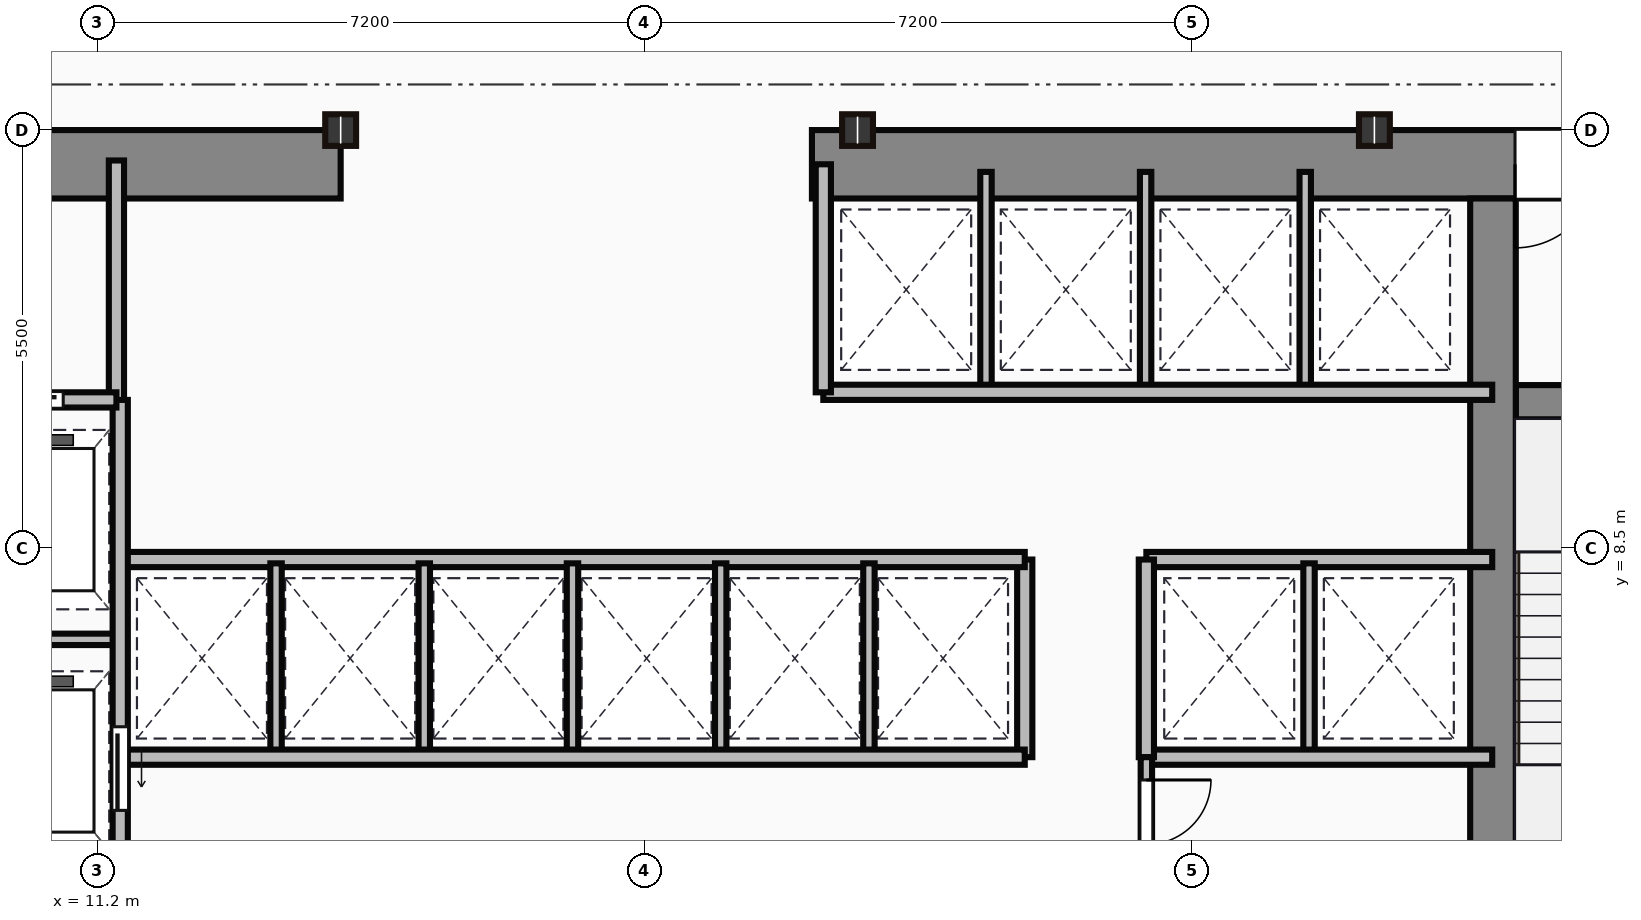
"""IFC4 building model, lengths in metres.
Left out: names, types, materials, properties, quantities, classifications, styles, units other than length and angle.
Written with IfcOpenShell. Run it as: python <this file> out.ifc"""

import sys

from ifc_helpers import new_model, si_unit, direction, frame, frame_2d, origin, origin_2d, place, context, subcontext, project, spatial, rectangle, i_section, extrude, source, transform, mapped, element, fill, save


model = new_model("IFC4")
c1 = context("Model", 3, precision=1e-05, world=origin(), true_north=direction((0.0, 1.0)))
c2 = subcontext(c1, "Body", "Model", "MODEL_VIEW")
j1 = project(units=[si_unit("LENGTHUNIT", "METRE"), si_unit("PLANEANGLEUNIT", "RADIAN")], contexts=[c1])
p1 = place(None, origin())
s1 = spatial("IfcSite", under=j1, at=p1, CompositionType="ELEMENT")
p2 = place(p1, origin())
s2 = spatial("IfcBuilding", under=s1, at=p2, CompositionType="ELEMENT")
p3 = place(p2, frame((0.0, 0.0, 72.65)))
s3 = spatial("IfcBuildingStorey", under=s2, at=p3, CompositionType="ELEMENT", Elevation=72.65)
m1 = source(origin(), c2, "Body", "SweptSolid", [
    extrude(rectangle(XDim=9.1, YDim=0.9, at=frame_2d((4.55, 0.0))), origin(), (0.0, 0.0, 1.0), 3.65),
])
p4 = place(p3, frame((5.3, 13.55, 0.0), z_axis=(0.0, 0.0, 1.0), x_axis=(1.0, 0.0, 0.0)))
e1 = element("IfcWall", 1, at=p4, inside=s3, PredefinedType="SHEAR", context=c2, shape_type="MappedRepresentation", body=[
    mapped(m1, transform((0.0, 0.0, 0.0))),
])
p5 = place(p4, frame((4.1, 0.0, 0.0)))
e2 = element("IfcOpeningElement", 2, at=p5, cuts=e1, PredefinedType="OPENING", context=c2, shape_type="SweptSolid", body=[
    extrude(rectangle(XDim=1.1, YDim=2.15, at=frame_2d((0.55, 1.075))), frame((0.0, 0.46, 0.0), z_axis=(0.0, -1.0, 0.0), x_axis=(1.0, 0.0, 0.0)), (0.0, 0.0, 1.0), 0.92),
])
m2 = source(origin(), c2, "Body", "SweptSolid", [
    extrude(rectangle(XDim=12.6, YDim=0.9, at=frame_2d((6.3, 0.0))), origin(), (0.0, 0.0, 1.0), 3.65),
])
p6 = place(p3, frame((20.6, 13.55, 0.0), z_axis=(0.0, 0.0, 1.0), x_axis=(1.0, 0.0, 0.0)))
e3 = element("IfcWall", 3, at=p6, inside=s3, PredefinedType="SHEAR", context=c2, shape_type="MappedRepresentation", body=[
    mapped(m2, transform((0.0, 0.0, 0.0))),
])
p7 = place(p6, frame((9.25, 0.0, 0.0)))
e4 = element("IfcOpeningElement", 4, at=p7, cuts=e3, PredefinedType="OPENING", context=c2, shape_type="SweptSolid", body=[
    extrude(rectangle(XDim=1.1, YDim=2.15, at=frame_2d((0.55, 1.075))), frame((0.0, 0.46, 0.0), z_axis=(0.0, -1.0, 0.0), x_axis=(1.0, 0.0, 0.0)), (0.0, 0.0, 1.0), 0.92),
])
m3 = source(origin(), c2, "Body", "SweptSolid", [
    extrude(rectangle(XDim=12.2, YDim=0.6, at=frame_2d((6.1, 0.0))), origin(), (0.0, 0.0, 1.0), 3.65),
])
p8 = place(p3, frame((29.56, 0.9, 0.0), z_axis=(0.0, 0.0, 1.0), x_axis=(0.0, 1.0, 0.0)))
e5 = element("IfcWall", 5, at=p8, inside=s3, PredefinedType="SHEAR", context=c2, shape_type="MappedRepresentation", body=[
    mapped(m3, transform((0.0, 0.0, 0.0))),
])
m4 = source(origin(), c2, "Body", "SweptSolid", [
    extrude(rectangle(XDim=3.39, YDim=0.45, at=frame_2d((1.695, 0.0))), origin(), (0.0, 0.0, 1.0), 3.65),
])
p9 = place(p3, frame((29.86, 10.42, 0.0), z_axis=(0.0, 0.0, 1.0), x_axis=(1.0, 0.0, 0.0)))
e6 = element("IfcWall", 6, at=p9, inside=s3, PredefinedType="SHEAR", context=c2, shape_type="MappedRepresentation", body=[
    mapped(m4, transform((0.0, 0.0, 0.0))),
])
p10 = place(p9, frame((1.1, 0.0, 0.0)))
e7 = element("IfcOpeningElement", 7, at=p10, cuts=e6, PredefinedType="OPENING", context=c2, shape_type="SweptSolid", body=[
    extrude(rectangle(XDim=1.1, YDim=2.15, at=frame_2d((0.55, 1.075))), frame((0.0, 0.235, 0.0), z_axis=(0.0, -1.0, 0.0), x_axis=(1.0, 0.0, 0.0)), (0.0, 0.0, 1.0), 0.47),
])
m5 = source(origin(), c2, "Body", "SweptSolid", [
    extrude(i_section(OverallWidth=0.406, OverallDepth=0.416, WebThickness=0.03, FlangeThickness=0.048, at=origin_2d()), origin(), (0.0, 0.0, 1.0), 3.65),
])
for number, where, z_axis, x_axis in (
    (8, (14.4, 14.0, 0.0), (0.0, 0.0, 1.0), (1.0, 0.0, 0.0)),
    (9, (21.2, 14.0, 0.0), (0.0, 0.0, 1.0), (1.0, 0.0, 0.0)),
    (10, (28.0, 14.0, 0.0), (0.0, 0.0, 1.0), (1.0, 0.0, 0.0)),
):
    element("IfcColumn", number, at=place(p3, frame(where, z_axis=z_axis, x_axis=x_axis)), inside=s3, PredefinedType="COLUMN", context=c2, shape_type="MappedRepresentation", body=[
        mapped(m5, transform((0.0, 0.0, 0.0))),
    ])
m6 = source(origin(), c2, "Body", "SweptSolid", [
    extrude(rectangle(XDim=3.18, YDim=0.2, at=frame_2d((1.59, 0.0))), origin(), (0.0, 0.0, 1.0), 3.4),
])
p11 = place(p3, frame((11.45, 10.42, 0.0), z_axis=(0.0, 0.0, 1.0), x_axis=(0.0, 1.0, 0.0)))
e11 = element("IfcWall", 11, at=p11, inside=s3, PredefinedType="PARTITIONING", context=c2, shape_type="MappedRepresentation", body=[
    mapped(m6, transform((0.0, 0.0, 0.0))),
])
m7 = source(origin(), c2, "Body", "SweptSolid", [
    extrude(rectangle(XDim=2.35, YDim=0.2, at=frame_2d((1.175, 0.0))), origin(), (0.0, 0.0, 1.0), 3.4),
])
p12 = place(p3, frame((9.1, 10.45, 0.0), z_axis=(0.0, 0.0, 1.0), x_axis=(1.0, 0.0, 0.0)))
e12 = element("IfcWall", 12, at=p12, inside=s3, PredefinedType="PARTITIONING", context=c2, shape_type="MappedRepresentation", body=[
    mapped(m7, transform((0.0, 0.0, 0.0))),
])
p13 = place(p12, frame((0.55, 0.0, 0.0)))
e13 = element("IfcOpeningElement", 13, at=p13, cuts=e12, PredefinedType="OPENING", context=c2, shape_type="SweptSolid", body=[
    extrude(rectangle(XDim=1.1, YDim=2.15, at=frame_2d((0.55, 1.075))), frame((0.0, 0.11, 0.0), z_axis=(0.0, -1.0, 0.0), x_axis=(1.0, 0.0, 0.0)), (0.0, 0.0, 1.0), 0.22),
])
m8 = source(origin(), c2, "Body", "SweptSolid", [
    extrude(rectangle(XDim=9.6, YDim=0.2, at=frame_2d((4.8, 0.0))), origin(), (0.0, 0.0, 1.0), 3.4),
])
p14 = place(p3, frame((11.5, 0.85, 0.0), z_axis=(0.0, 0.0, 1.0), x_axis=(0.0, 1.0, 0.0)))
e14 = element("IfcWall", 14, at=p14, inside=s3, PredefinedType="PARTITIONING", context=c2, shape_type="MappedRepresentation", body=[
    mapped(m8, transform((0.0, 0.0, 0.0))),
])
p15 = place(p14, frame((4.2, 0.0, 0.0)))
e15 = element("IfcOpeningElement", 15, at=p15, cuts=e14, PredefinedType="OPENING", context=c2, shape_type="SweptSolid", body=[
    extrude(rectangle(XDim=1.1, YDim=2.15, at=frame_2d((0.55, 1.075))), frame((0.0, 0.11, 0.0), z_axis=(0.0, -1.0, 0.0), x_axis=(1.0, 0.0, 0.0)), (0.0, 0.0, 1.0), 0.22),
])
p16 = place(p14, frame((0.9, 0.0, 0.0)))
e16 = element("IfcOpeningElement", 16, at=p16, cuts=e14, PredefinedType="OPENING", context=c2, shape_type="SweptSolid", body=[
    extrude(rectangle(XDim=1.2, YDim=2.15, at=frame_2d((0.6, 1.075))), frame((0.0, 0.11, 0.0), z_axis=(0.0, -1.0, 0.0), x_axis=(1.0, 0.0, 0.0)), (0.0, 0.0, 1.0), 0.22),
])
m9 = source(origin(), c2, "Body", "SweptSolid", [
    extrude(rectangle(XDim=2.4, YDim=0.15, at=frame_2d((1.2, 0.0))), origin(), (0.0, 0.0, 1.0), 3.4),
])
p17 = place(p3, frame((9.1, 7.3, 0.0), z_axis=(0.0, 0.0, 1.0), x_axis=(1.0, 0.0, 0.0)))
e17 = element("IfcWall", 17, at=p17, inside=s3, PredefinedType="PARTITIONING", context=c2, shape_type="MappedRepresentation", body=[
    mapped(m9, transform((0.0, 0.0, 0.0))),
])
m10 = source(origin(), c2, "Body", "SweptSolid", [
    extrude(rectangle(XDim=11.85, YDim=0.2, at=frame_2d((5.925, 0.0))), origin(), (0.0, 0.0, 1.0), 3.4),
])
for number, where, z_axis, x_axis in (
    (18, (11.55, 5.75, 0.0), (0.0, 0.0, 1.0), (1.0, 0.0, 0.0)),
    (19, (11.55, 8.35, 0.0), (0.0, 0.0, 1.0), (1.0, 0.0, 0.0)),
):
    element("IfcWall", number, at=place(p3, frame(where, z_axis=z_axis, x_axis=x_axis)), inside=s3, PredefinedType="PARTITIONING", context=c2, shape_type="MappedRepresentation", body=[
        mapped(m10, transform((0.0, 0.0, 0.0))),
    ])
m11 = source(origin(), c2, "Body", "SweptSolid", [
    extrude(rectangle(XDim=2.6, YDim=0.2, at=frame_2d((1.3, 0.0))), origin(), (0.0, 0.0, 1.0), 3.4),
])
p18 = place(p3, frame((23.4, 5.75, 0.0), z_axis=(0.0, 0.0, 1.0), x_axis=(0.0, 1.0, 0.0)))
e20 = element("IfcWall", 20, at=p18, inside=s3, PredefinedType="PARTITIONING", context=c2, shape_type="MappedRepresentation", body=[
    mapped(m11, transform((0.0, 0.0, 0.0))),
])
m12 = source(origin(), c2, "Body", "SweptSolid", [
    extrude(rectangle(XDim=2.5, YDim=0.15, at=frame_2d((1.25, 0.0))), origin(), (0.0, 0.0, 1.0), 3.4),
])
for number, where, z_axis, x_axis in (
    (21, (13.55, 5.8, 0.0), (0.0, 0.0, 1.0), (0.0, 1.0, 0.0)),
    (22, (15.5, 5.8, 0.0), (0.0, 0.0, 1.0), (0.0, 1.0, 0.0)),
    (23, (17.45, 5.8, 0.0), (0.0, 0.0, 1.0), (0.0, 1.0, 0.0)),
    (24, (19.4, 5.8, 0.0), (0.0, 0.0, 1.0), (0.0, 1.0, 0.0)),
    (25, (21.35, 5.8, 0.0), (0.0, 0.0, 1.0), (0.0, 1.0, 0.0)),
):
    element("IfcWall", number, at=place(p3, frame(where, z_axis=z_axis, x_axis=x_axis)), inside=s3, PredefinedType="PARTITIONING", context=c2, shape_type="MappedRepresentation", body=[
        mapped(m12, transform((0.0, 0.0, 0.0))),
    ])
m13 = source(origin(), c2, "Body", "SweptSolid", [
    extrude(rectangle(XDim=8.8, YDim=0.2, at=frame_2d((4.4, 0.0))), origin(), (0.0, 0.0, 1.0), 3.4),
])
p19 = place(p3, frame((20.75, 10.55, 0.0), z_axis=(0.0, 0.0, 1.0), x_axis=(1.0, 0.0, 0.0)))
e26 = element("IfcWall", 26, at=p19, inside=s3, PredefinedType="PARTITIONING", context=c2, shape_type="MappedRepresentation", body=[
    mapped(m13, transform((0.0, 0.0, 0.0))),
])
m14 = source(origin(), c2, "Body", "SweptSolid", [
    extrude(rectangle(XDim=3.0, YDim=0.2, at=frame_2d((1.5, 0.0))), origin(), (0.0, 0.0, 1.0), 3.4),
])
p20 = place(p3, frame((20.75, 10.55, 0.0), z_axis=(0.0, 0.0, 1.0), x_axis=(0.0, 1.0, 0.0)))
e27 = element("IfcWall", 27, at=p20, inside=s3, PredefinedType="PARTITIONING", context=c2, shape_type="MappedRepresentation", body=[
    mapped(m14, transform((0.0, 0.0, 0.0))),
])
m15 = source(origin(), c2, "Body", "SweptSolid", [
    extrude(rectangle(XDim=2.85, YDim=0.15, at=frame_2d((1.425, 0.0))), origin(), (0.0, 0.0, 1.0), 3.4),
])
for number, where, z_axis, x_axis in (
    (28, (22.89, 10.6, 0.0), (0.0, 0.0, 1.0), (0.0, 1.0, 0.0)),
    (29, (24.99, 10.6, 0.0), (0.0, 0.0, 1.0), (0.0, 1.0, 0.0)),
    (30, (27.09, 10.6, 0.0), (0.0, 0.0, 1.0), (0.0, 1.0, 0.0)),
):
    element("IfcWall", number, at=place(p3, frame(where, z_axis=z_axis, x_axis=x_axis)), inside=s3, PredefinedType="PARTITIONING", context=c2, shape_type="MappedRepresentation", body=[
        mapped(m15, transform((0.0, 0.0, 0.0))),
    ])
m16 = source(origin(), c2, "Body", "SweptSolid", [
    extrude(rectangle(XDim=4.55, YDim=0.2, at=frame_2d((2.275, 0.0))), origin(), (0.0, 0.0, 1.0), 3.4),
])
for number, where, z_axis, x_axis in (
    (31, (25.0, 8.35, 0.0), (0.0, 0.0, 1.0), (1.0, 0.0, 0.0)),
    (32, (25.0, 5.75, 0.0), (0.0, 0.0, 1.0), (1.0, 0.0, 0.0)),
):
    element("IfcWall", number, at=place(p3, frame(where, z_axis=z_axis, x_axis=x_axis)), inside=s3, PredefinedType="PARTITIONING", context=c2, shape_type="MappedRepresentation", body=[
        mapped(m16, transform((0.0, 0.0, 0.0))),
    ])
p21 = place(p3, frame((25.0, 5.75, 0.0), z_axis=(0.0, 0.0, 1.0), x_axis=(0.0, 1.0, 0.0)))
e33 = element("IfcWall", 33, at=p21, inside=s3, PredefinedType="PARTITIONING", context=c2, shape_type="MappedRepresentation", body=[
    mapped(m11, transform((0.0, 0.0, 0.0))),
])
p22 = place(p3, frame((27.14, 5.8, 0.0), z_axis=(0.0, 0.0, 1.0), x_axis=(0.0, 1.0, 0.0)))
e34 = element("IfcWall", 34, at=p22, inside=s3, PredefinedType="PARTITIONING", context=c2, shape_type="MappedRepresentation", body=[
    mapped(m12, transform((0.0, 0.0, 0.0))),
])
m17 = source(origin(), c2, "Body", "SweptSolid", [
    extrude(rectangle(XDim=4.9, YDim=0.15, at=frame_2d((2.45, 0.0))), origin(), (0.0, 0.0, 1.0), 3.4),
])
p23 = place(p3, frame((25.0, 0.85, 0.0), z_axis=(0.0, 0.0, 1.0), x_axis=(0.0, 1.0, 0.0)))
e35 = element("IfcWall", 35, at=p23, inside=s3, PredefinedType="PARTITIONING", context=c2, shape_type="MappedRepresentation", body=[
    mapped(m17, transform((0.0, 0.0, 0.0))),
])
p24 = place(p23, frame((2.0, 0.0, 0.0)))
e36 = element("IfcOpeningElement", 36, at=p24, cuts=e35, PredefinedType="OPENING", context=c2, shape_type="SweptSolid", body=[
    extrude(rectangle(XDim=0.95, YDim=2.15, at=frame_2d((0.475, 1.075))), frame((0.0, 0.085, 0.0), z_axis=(0.0, -1.0, 0.0), x_axis=(1.0, 0.0, 0.0)), (0.0, 0.0, 1.0), 0.17),
])
p25 = place(p23, frame((3.75, 0.0, 0.0)))
e37 = element("IfcOpeningElement", 37, at=p25, cuts=e35, PredefinedType="OPENING", context=c2, shape_type="SweptSolid", body=[
    extrude(rectangle(XDim=0.85, YDim=2.15, at=frame_2d((0.425, 1.075))), frame((0.0, 0.085, 0.0), z_axis=(0.0, -1.0, 0.0), x_axis=(1.0, 0.0, 0.0)), (0.0, 0.0, 1.0), 0.17),
])
m18 = source(origin(), c2, "Body", "SweptSolid", [
    extrude(rectangle(XDim=1.1, YDim=2.15, at=frame_2d((0.55, 1.075))), frame((0.0, 0.025, 0.0), z_axis=(0.0, -1.0, 0.0), x_axis=(1.0, 0.0, 0.0)), (0.0, 0.0, 1.0), 0.05),
])
p26 = place(p7, origin())
e38 = element("IfcDoor", 38, at=p26, inside=s3, OperationType="SINGLE_SWING_LEFT", PredefinedType="DOOR", context=c2, shape_type="MappedRepresentation", body=[
    mapped(m18, transform((0.0, 0.0, 0.0))),
])
fill(e4, e38)
p27 = place(p13, origin())
e39 = element("IfcDoor", 39, at=p27, inside=s3, OperationType="SLIDING_TO_LEFT", PredefinedType="DOOR", context=c2, shape_type="MappedRepresentation", body=[
    mapped(m18, transform((0.0, 0.0, 0.0))),
])
fill(e13, e39)
p28 = place(p15, frame((1.1, 0.0, 0.0), z_axis=(0.0, 0.0, 1.0), x_axis=(-1.0, 0.0, 0.0)))
e40 = element("IfcDoor", 40, at=p28, inside=s3, OperationType="SLIDING_TO_LEFT", PredefinedType="DOOR", context=c2, shape_type="MappedRepresentation", body=[
    mapped(m18, transform((0.0, 0.0, 0.0))),
])
fill(e15, e40)
m19 = source(origin(), c2, "Body", "SweptSolid", [
    extrude(rectangle(XDim=0.85, YDim=2.15, at=frame_2d((0.425, 1.075))), frame((0.0, 0.025, 0.0), z_axis=(0.0, -1.0, 0.0), x_axis=(1.0, 0.0, 0.0)), (0.0, 0.0, 1.0), 0.05),
])
p29 = place(p25, origin())
e41 = element("IfcDoor", 41, at=p29, inside=s3, OperationType="SINGLE_SWING_RIGHT", PredefinedType="DOOR", context=c2, shape_type="MappedRepresentation", body=[
    mapped(m19, transform((0.0, 0.0, 0.0))),
])
fill(e37, e41)
save(model, sys.argv[1])
